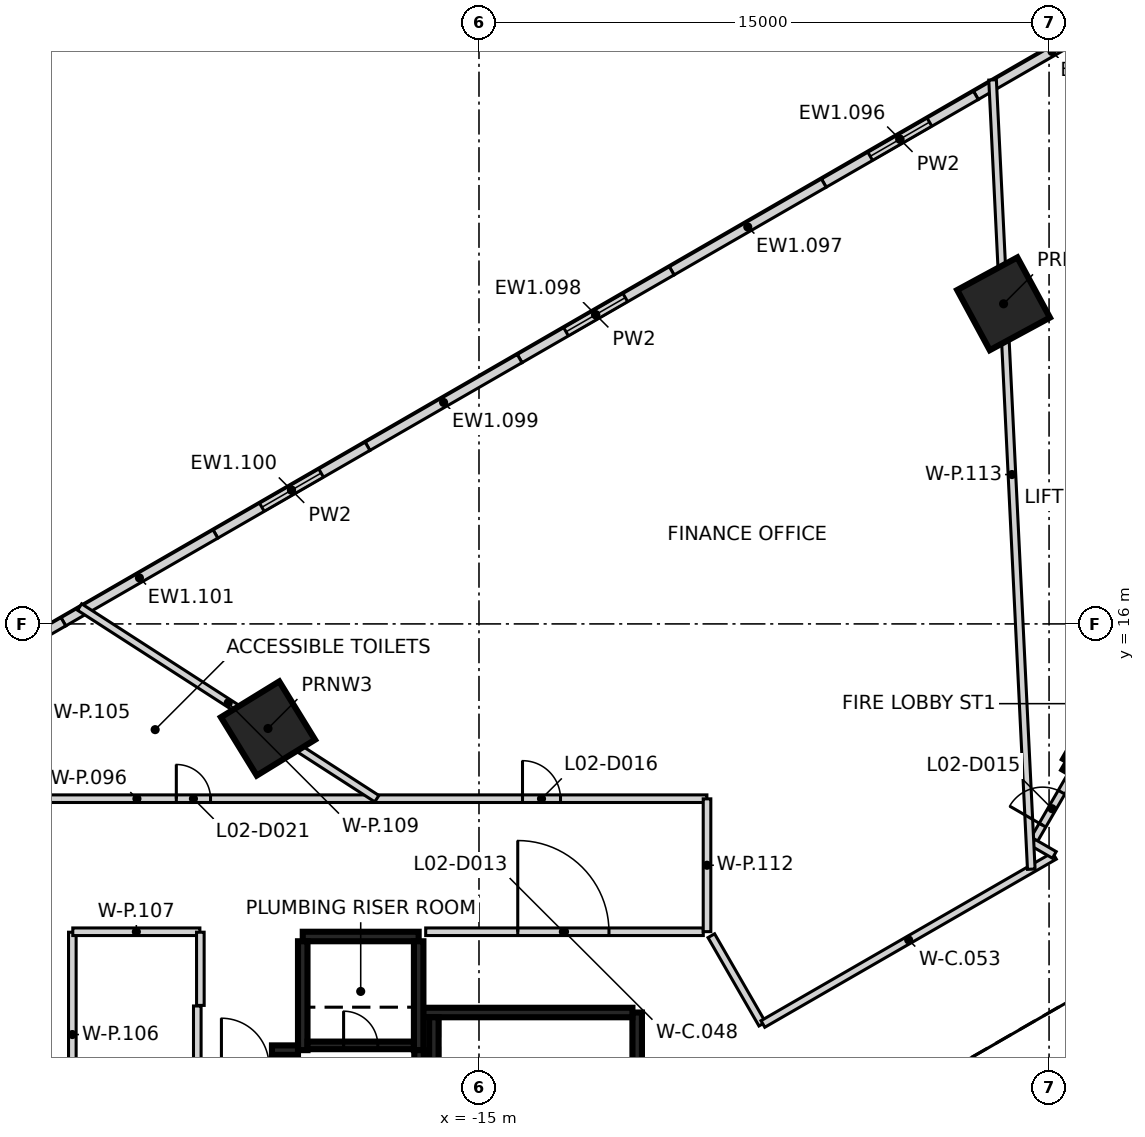
"""IFC4 building model, lengths in metres.
Left out: names, types, materials, properties, quantities, classifications, styles, units other than length and angle.
Written with IfcOpenShell. Run it as: python <this file> out.ifc"""

import sys

from ifc_helpers import new_model, si_unit, direction, frame, frame_2d, origin, origin_2d, place, context, subcontext, project, spatial, rectangle, extrude, element, fill, save


model = new_model("IFC4")
c1 = context("Model", 3, precision=1e-05, world=origin(), true_north=direction((0.0, 1.0)))
c2 = subcontext(c1, "Body", "Model", "MODEL_VIEW")
j1 = project(units=[si_unit("LENGTHUNIT", "METRE"), si_unit("PLANEANGLEUNIT", "RADIAN")], contexts=[c1])
p1 = place(None, origin())
s1 = spatial("IfcSite", under=j1, at=p1, CompositionType="ELEMENT")
p2 = place(p1, origin())
s2 = spatial("IfcBuilding", under=s1, at=p2, CompositionType="ELEMENT")
p3 = place(p2, frame((0.0, 0.0, 14.0)))
s3 = spatial("IfcBuildingStorey", under=s2, at=p3, CompositionType="ELEMENT", Elevation=14.0)
for number, where, z_axis, x_axis in (
    (1, (-1.197, 24.423, -0.35), (0.0, 0.0, 1.0), (-0.476, 0.879, 0.0)),
    (2, (-20.552, 13.248, -0.35), (0.0, 0.0, 1.0), (-0.523, 0.852, 0.0)),
):
    element("IfcColumn", number, at=place(p3, frame(where, z_axis=z_axis, x_axis=x_axis)), inside=s3, PredefinedType="COLUMN", context=c2, shape_type="SweptSolid", body=[
        extrude(rectangle(XDim=1.8, YDim=1.8, at=origin_2d()), origin(), (0.0, 0.0, 1.0), 3.1),
    ])
p4 = place(p3, frame((-1.925, 29.907, 0.0), z_axis=(0.0, 0.0, 1.0), x_axis=(0.866229571029, 0.499646205105, 0.0)))
e3 = element("IfcWall", 3, at=p4, inside=s3, PredefinedType="SOLIDWALL", context=c2, shape_type="SweptSolid", body=[
    extrude(rectangle(XDim=4.62, YDim=0.25, at=frame_2d((2.31, 0.0))), origin(), (0.0, 0.0, 1.0), 5.15),
])
p5 = place(p3, frame((-5.927, 27.598, 0.0), z_axis=(0.0, 0.0, 1.0), x_axis=(0.866193503994, 0.4997087288, 0.0)))
e4 = element("IfcWall", 4, at=p5, inside=s3, PredefinedType="SOLIDWALL", context=c2, shape_type="SweptSolid", body=[
    extrude(rectangle(XDim=4.62, YDim=0.25, at=frame_2d((2.31, 0.0))), origin(), (0.0, 0.0, 1.0), 5.15),
])
p6 = place(p5, frame((1.41, 0.0, 1.1)))
e5 = element("IfcOpeningElement", 5, at=p6, cuts=e4, PredefinedType="OPENING", context=c2, shape_type="SweptSolid", body=[
    extrude(rectangle(XDim=1.8, YDim=1.5, at=frame_2d((0.9, 0.75))), frame((0.0, 0.135, 0.0), z_axis=(0.0, -1.0, 0.0), x_axis=(1.0, 0.0, 0.0)), (0.0, 0.0, 1.0), 0.27),
])
p7 = place(p3, frame((-9.929, 25.29, 0.0), z_axis=(0.0, 0.0, 1.0), x_axis=(0.866216377649, 0.499669077583, 0.0)))
e6 = element("IfcWall", 6, at=p7, inside=s3, PredefinedType="SOLIDWALL", context=c2, shape_type="SweptSolid", body=[
    extrude(rectangle(XDim=4.62, YDim=0.25, at=frame_2d((2.31, 0.0))), origin(), (0.0, 0.0, 1.0), 5.15),
])
p8 = place(p3, frame((-13.93, 22.982, 0.0), z_axis=(0.0, 0.0, 1.0), x_axis=(0.866216377649, 0.499669077583, 0.0)))
e7 = element("IfcWall", 7, at=p8, inside=s3, PredefinedType="SOLIDWALL", context=c2, shape_type="SweptSolid", body=[
    extrude(rectangle(XDim=4.62, YDim=0.25, at=frame_2d((2.31, 0.0))), origin(), (0.0, 0.0, 1.0), 5.15),
])
p9 = place(p8, frame((1.41, 0.0, 1.1)))
e8 = element("IfcOpeningElement", 8, at=p9, cuts=e7, PredefinedType="OPENING", context=c2, shape_type="SweptSolid", body=[
    extrude(rectangle(XDim=1.8, YDim=1.5, at=frame_2d((0.9, 0.75))), frame((0.0, 0.135, 0.0), z_axis=(0.0, -1.0, 0.0), x_axis=(1.0, 0.0, 0.0)), (0.0, 0.0, 1.0), 0.27),
])
p10 = place(p3, frame((-17.932, 20.673, 0.0), z_axis=(0.0, 0.0, 1.0), x_axis=(0.866216377649, 0.499669077583, 0.0)))
e9 = element("IfcWall", 9, at=p10, inside=s3, PredefinedType="SOLIDWALL", context=c2, shape_type="SweptSolid", body=[
    extrude(rectangle(XDim=4.62, YDim=0.25, at=frame_2d((2.31, 0.0))), origin(), (0.0, 0.0, 1.0), 5.15),
])
p11 = place(p3, frame((-21.934, 18.365, 0.0), z_axis=(0.0, 0.0, 1.0), x_axis=(0.866229571029, 0.499646205105, 0.0)))
e10 = element("IfcWall", 10, at=p11, inside=s3, PredefinedType="SOLIDWALL", context=c2, shape_type="SweptSolid", body=[
    extrude(rectangle(XDim=4.62, YDim=0.25, at=frame_2d((2.31, 0.0))), origin(), (0.0, 0.0, 1.0), 5.15),
])
p12 = place(p11, frame((1.41, 0.0, 1.1)))
e11 = element("IfcOpeningElement", 11, at=p12, cuts=e10, PredefinedType="OPENING", context=c2, shape_type="SweptSolid", body=[
    extrude(rectangle(XDim=1.8, YDim=1.5, at=frame_2d((0.9, 0.75))), frame((0.0, 0.135, 0.0), z_axis=(0.0, -1.0, 0.0), x_axis=(1.0, 0.0, 0.0)), (0.0, 0.0, 1.0), 0.27),
])
p13 = place(p3, frame((-25.936, 16.057, 0.0), z_axis=(0.0, 0.0, 1.0), x_axis=(0.866216377649, 0.499669077583, 0.0)))
e12 = element("IfcWall", 12, at=p13, inside=s3, PredefinedType="SOLIDWALL", context=c2, shape_type="SweptSolid", body=[
    extrude(rectangle(XDim=4.62, YDim=0.25, at=frame_2d((2.31, 0.0))), origin(), (0.0, 0.0, 1.0), 5.15),
])
p14 = place(p3, frame((-29.938, 13.748, 0.0), z_axis=(0.0, 0.0, 1.0), x_axis=(0.866193503994, 0.4997087288, 0.0)))
e13 = element("IfcWall", 13, at=p14, inside=s3, PredefinedType="SOLIDWALL", context=c2, shape_type="SweptSolid", body=[
    extrude(rectangle(XDim=4.62, YDim=0.25, at=frame_2d((2.31, 0.0))), origin(), (0.0, 0.0, 1.0), 5.15),
])
p15 = place(p14, frame((1.41, 0.0, 1.1)))
e14 = element("IfcOpeningElement", 14, at=p15, cuts=e13, PredefinedType="OPENING", context=c2, shape_type="SweptSolid", body=[
    extrude(rectangle(XDim=1.8, YDim=1.5, at=frame_2d((0.9, 0.75))), frame((0.0, 0.135, 0.0), z_axis=(0.0, -1.0, 0.0), x_axis=(1.0, 0.0, 0.0)), (0.0, 0.0, 1.0), 0.27),
])
p16 = place(p3, frame((-10.837, 5.775, 0.0), z_axis=(0.0, 0.0, 1.0), x_axis=(0.0, -1.0, 0.0)))
e15 = element("IfcWall", 15, at=p16, inside=s3, PredefinedType="SHEAR", context=c2, shape_type="SweptSolid", body=[
    extrude(rectangle(XDim=11.55, YDim=0.25, at=frame_2d((5.775, 0.0))), origin(), (0.0, 0.0, 1.0), 5.15),
])
p17 = place(p16, frame((10.025, 0.0, 0.0)))
e16 = element("IfcOpeningElement", 16, at=p17, cuts=e15, PredefinedType="OPENING", context=c2, shape_type="SweptSolid", body=[
    extrude(rectangle(XDim=1.2, YDim=2.1, at=frame_2d((0.6, 1.05))), frame((0.0, 0.135, 0.0), z_axis=(0.0, -1.0, 0.0), x_axis=(1.0, 0.0, 0.0)), (0.0, 0.0, 1.0), 0.27),
])
p18 = place(p16, frame((8.725, 0.0, 0.0)))
e17 = element("IfcOpeningElement", 17, at=p18, cuts=e15, PredefinedType="OPENING", context=c2, shape_type="SweptSolid", body=[
    extrude(rectangle(XDim=1.2, YDim=2.1, at=frame_2d((0.6, 1.05))), frame((0.0, 0.135, 0.0), z_axis=(0.0, -1.0, 0.0), x_axis=(1.0, 0.0, 0.0)), (0.0, 0.0, 1.0), 0.27),
])
p19 = place(p3, frame((-16.472, 5.775, 0.0), z_axis=(0.0, 0.0, 1.0), x_axis=(1.0, 0.0, 0.0)))
e18 = element("IfcWall", 18, at=p19, inside=s3, PredefinedType="SHEAR", context=c2, shape_type="SweptSolid", body=[
    extrude(rectangle(XDim=5.51, YDim=0.25, at=frame_2d((2.755, 0.0))), origin(), (0.0, 0.0, 1.0), 5.15),
])
p20 = place(p3, frame((-19.637, 7.775, 0.0), z_axis=(0.0, 0.0, 1.0), x_axis=(1.0, 0.0, 0.0)))
e19 = element("IfcWall", 19, at=p20, inside=s3, PredefinedType="SHEAR", context=c2, shape_type="SweptSolid", body=[
    extrude(rectangle(XDim=3.05, YDim=0.25, at=frame_2d((1.525, 0.0))), origin(), (0.0, 0.0, 1.0), 5.15),
])
for number, where, z_axis, x_axis in (
    (20, (-16.587, 7.65, 0.0), (0.0, 0.0, 1.0), (0.0, -1.0, 0.0)),
    (21, (-19.637, 4.785, 0.0), (0.0, 0.0, 1.0), (0.0, 1.0, 0.0)),
):
    element("IfcWall", number, at=place(p3, frame(where, z_axis=z_axis, x_axis=x_axis)), inside=s3, PredefinedType="SHEAR", context=c2, shape_type="SweptSolid", body=[
        extrude(rectangle(XDim=2.865, YDim=0.25, at=frame_2d((1.432, 0.0))), origin(), (0.0, 0.0, 1.0), 5.15),
    ])
p21 = place(p3, frame((-16.187, 3.2, 0.0), z_axis=(0.0, 0.0, 1.0), x_axis=(0.0, 1.0, 0.0)))
e22 = element("IfcWall", 22, at=p21, inside=s3, PredefinedType="SHEAR", context=c2, shape_type="SweptSolid", body=[
    extrude(rectangle(XDim=2.449, YDim=0.25, at=frame_2d((1.225, 0.0))), origin(), (0.0, 0.0, 1.0), 5.15),
])
p22 = place(p3, frame((-20.447, 4.785, 0.0), z_axis=(0.0, 0.0, 1.0), x_axis=(1.0, 0.0, 0.0)))
e23 = element("IfcWall", 23, at=p22, inside=s3, PredefinedType="SHEAR", context=c2, shape_type="SweptSolid", body=[
    extrude(rectangle(XDim=0.685, YDim=0.25, at=frame_2d((0.342, 0.0))), origin(), (0.0, 0.0, 1.0), 5.15),
])
p23 = place(p3, frame((-16.577, 4.785, 0.0), z_axis=(0.0, 0.0, 1.0), x_axis=(0.0, -1.0, 0.0)))
e24 = element("IfcWall", 24, at=p23, inside=s3, PredefinedType="SHEAR", context=c2, shape_type="SweptSolid", body=[
    extrude(rectangle(XDim=0.344, YDim=0.25, at=frame_2d((0.172, 0.0))), origin(), (0.0, 0.0, 1.0), 5.15),
])
p24 = place(p3, frame((-19.511, 4.91, 0.0), z_axis=(0.0, 0.0, 1.0), x_axis=(1.0, 0.0, 0.0)))
e25 = element("IfcWall", 25, at=p24, inside=s3, PredefinedType="SHEAR", context=c2, shape_type="SweptSolid", body=[
    extrude(rectangle(XDim=2.798, YDim=0.2, at=frame_2d((1.399, 0.0))), origin(), (0.0, 0.0, 1.0), 5.15),
])
p25 = place(p24, frame((0.949, 0.0, 0.0)))
e26 = element("IfcOpeningElement", 26, at=p25, cuts=e25, PredefinedType="OPENING", context=c2, shape_type="SweptSolid", body=[
    extrude(rectangle(XDim=0.9, YDim=2.1, at=frame_2d((0.45, 1.05))), frame((0.0, 0.11, 0.0), z_axis=(0.0, -1.0, 0.0), x_axis=(1.0, 0.0, 0.0)), (0.0, 0.0, 1.0), 0.22),
])
p26 = place(p3, frame((10.42, 6.498, 0.0), z_axis=(0.0, 0.0, 1.0), x_axis=(-0.866021906294, 0.500006057782, 0.0)))
e27 = element("IfcWall", 27, at=p26, inside=s3, PredefinedType="SHEAR", context=c2, shape_type="SweptSolid", body=[
    extrude(rectangle(XDim=11.55, YDim=0.25, at=frame_2d((5.775, 0.0))), origin(), (0.0, 0.0, 1.0), 5.15),
])
p27 = place(p26, frame((10.025, 0.0, 0.0)))
e28 = element("IfcOpeningElement", 28, at=p27, cuts=e27, PredefinedType="OPENING", context=c2, shape_type="SweptSolid", body=[
    extrude(rectangle(XDim=1.2, YDim=2.1, at=frame_2d((0.6, 1.05))), frame((0.0, 0.135, 0.0), z_axis=(0.0, -1.0, 0.0), x_axis=(1.0, 0.0, 0.0)), (0.0, 0.0, 1.0), 0.27),
])
p28 = place(p26, frame((8.725, 0.0, 0.0)))
e29 = element("IfcOpeningElement", 29, at=p28, cuts=e27, PredefinedType="OPENING", context=c2, shape_type="SweptSolid", body=[
    extrude(rectangle(XDim=1.2, YDim=2.1, at=frame_2d((0.6, 1.05))), frame((0.0, 0.135, 0.0), z_axis=(0.0, -1.0, 0.0), x_axis=(1.0, 0.0, 0.0)), (0.0, 0.0, 1.0), 0.27),
])
p29 = place(p3, frame((0.48, 12.381, 0.0), z_axis=(0.0, 0.0, 1.0), x_axis=(0.49999885962, 0.866026062182, 0.0)))
e30 = element("IfcWall", 30, at=p29, inside=s3, PredefinedType="SHEAR", context=c2, shape_type="SweptSolid", body=[
    extrude(rectangle(XDim=5.225, YDim=0.25, at=frame_2d((2.612, 0.0))), origin(), (0.0, 0.0, 1.0), 5.15),
])
p30 = place(p3, frame((-16.402, 7.9, 0.0), z_axis=(0.0, 0.0, 1.0), x_axis=(1.0, 0.0, 0.0)))
e31 = element("IfcWall", 31, at=p30, inside=s3, PredefinedType="PARTITIONING", context=c2, shape_type="SweptSolid", body=[
    extrude(rectangle(XDim=7.304, YDim=0.2, at=frame_2d((3.652, 0.0))), origin(), (0.0, 0.0, 1.0), 5.15),
])
p31 = place(p30, frame((2.422, 0.0, 0.0)))
e32 = element("IfcOpeningElement", 32, at=p31, cuts=e31, PredefinedType="OPENING", context=c2, shape_type="SweptSolid", body=[
    extrude(rectangle(XDim=2.4, YDim=2.1, at=frame_2d((1.2, 1.05))), frame((0.0, 0.11, 0.0), z_axis=(0.0, -1.0, 0.0), x_axis=(1.0, 0.0, 0.0)), (0.0, 0.0, 1.0), 0.22),
])
p32 = place(p3, frame((-8.887, 7.796, 0.0), z_axis=(0.0, 0.0, 1.0), x_axis=(0.499310200174, -0.866423293779, 0.0)))
e33 = element("IfcWall", 33, at=p32, inside=s3, PredefinedType="PARTITIONING", context=c2, shape_type="SweptSolid", body=[
    extrude(rectangle(XDim=2.683, YDim=0.2, at=frame_2d((1.342, 0.0))), origin(), (0.0, 0.0, 1.0), 5.15),
])
p33 = place(p3, frame((-7.53, 5.473, 0.0), z_axis=(0.0, 0.0, 1.0), x_axis=(0.866256262405, 0.499599927786, 0.0)))
e34 = element("IfcWall", 34, at=p33, inside=s3, PredefinedType="PARTITIONING", context=c2, shape_type="SweptSolid", body=[
    extrude(rectangle(XDim=8.855, YDim=0.2, at=frame_2d((4.428, 0.0))), origin(), (0.0, 0.0, 1.0), 5.15),
])
p34 = place(p3, frame((-0.43, 10.259, 0.0), z_axis=(0.0, 0.0, 1.0), x_axis=(0.500667330647, 0.865639777288, 0.0)))
e35 = element("IfcWall", 35, at=p34, inside=s3, PredefinedType="PARTITIONING", context=c2, shape_type="SweptSolid", body=[
    extrude(rectangle(XDim=1.983, YDim=0.2, at=frame_2d((0.991, 0.0))), origin(), (0.0, 0.0, 1.0), 5.15),
])
p35 = place(p34, frame((0.515, 0.0, 0.0)))
e36 = element("IfcOpeningElement", 36, at=p35, cuts=e35, PredefinedType="OPENING", context=c2, shape_type="SweptSolid", body=[
    extrude(rectangle(XDim=1.0, YDim=2.1, at=frame_2d((0.5, 1.05))), frame((0.0, 0.11, 0.0), z_axis=(0.0, -1.0, 0.0), x_axis=(1.0, 0.0, 0.0)), (0.0, 0.0, 1.0), 0.22),
])
p36 = place(p3, frame((-0.424, 10.246, 0.0), z_axis=(0.0, 0.0, 1.0), x_axis=(0.866360968405, -0.499418334089, 0.0)))
e37 = element("IfcWall", 37, at=p36, inside=s3, PredefinedType="PARTITIONING", context=c2, shape_type="SweptSolid", body=[
    extrude(rectangle(XDim=0.649, YDim=0.2, at=frame_2d((0.324, 0.0))), origin(), (0.0, 0.0, 1.0), 5.15),
])
p37 = place(p3, frame((-38.998, 11.401, 0.0), z_axis=(0.0, 0.0, 1.0), x_axis=(1.0, 0.0, 0.0)))
e38 = element("IfcWall", 38, at=p37, inside=s3, PredefinedType="PARTITIONING", context=c2, shape_type="SweptSolid", body=[
    extrude(rectangle(XDim=29.995, YDim=0.2, at=frame_2d((14.998, 0.0))), origin(), (0.0, 0.0, 1.0), 2.75),
])
p38 = place(p37, frame((25.143, 0.0, 0.0)))
e39 = element("IfcOpeningElement", 39, at=p38, cuts=e38, PredefinedType="OPENING", context=c2, shape_type="SweptSolid", body=[
    extrude(rectangle(XDim=1.0, YDim=2.1, at=frame_2d((0.5, 1.05))), frame((0.0, 0.11, 0.0), z_axis=(0.0, -1.0, 0.0), x_axis=(1.0, 0.0, 0.0)), (0.0, 0.0, 1.0), 0.22),
])
p39 = place(p37, frame((7.76, 0.0, 0.0)))
e40 = element("IfcOpeningElement", 40, at=p39, cuts=e38, PredefinedType="OPENING", context=c2, shape_type="SweptSolid", body=[
    extrude(rectangle(XDim=0.8, YDim=2.1, at=frame_2d((0.4, 1.05))), frame((0.0, 0.11, 0.0), z_axis=(0.0, -1.0, 0.0), x_axis=(1.0, 0.0, 0.0)), (0.0, 0.0, 1.0), 0.22),
])
p40 = place(p37, frame((16.034, 0.0, 0.0)))
e41 = element("IfcOpeningElement", 41, at=p40, cuts=e38, PredefinedType="OPENING", context=c2, shape_type="SweptSolid", body=[
    extrude(rectangle(XDim=0.9, YDim=2.1, at=frame_2d((0.45, 1.05))), frame((0.0, 0.11, 0.0), z_axis=(0.0, -1.0, 0.0), x_axis=(1.0, 0.0, 0.0)), (0.0, 0.0, 1.0), 0.22),
])
p41 = place(p3, frame((-25.7, 2.503, 0.0), z_axis=(0.0, 0.0, 1.0), x_axis=(0.0, 1.0, 0.0)))
e42 = element("IfcWall", 42, at=p41, inside=s3, PredefinedType="PARTITIONING", context=c2, shape_type="SweptSolid", body=[
    extrude(rectangle(XDim=5.385, YDim=0.2, at=frame_2d((2.692, 0.0))), origin(), (0.0, 0.0, 1.0), 5.15),
])
p42 = place(p3, frame((-25.688, 7.9, 0.0), z_axis=(0.0, 0.0, 1.0), x_axis=(1.0, 0.0, 0.0)))
e43 = element("IfcWall", 43, at=p42, inside=s3, PredefinedType="PARTITIONING", context=c2, shape_type="SweptSolid", body=[
    extrude(rectangle(XDim=3.344, YDim=0.2, at=frame_2d((1.672, 0.0))), origin(), (0.0, 0.0, 1.0), 5.15),
])
p43 = place(p3, frame((-25.509, 16.444, 0.0), z_axis=(0.0, 0.0, 1.0), x_axis=(0.840484744403, -0.541835209659, 0.0)))
e44 = element("IfcWall", 44, at=p43, inside=s3, PredefinedType="PARTITIONING", context=c2, shape_type="SweptSolid", body=[
    extrude(rectangle(XDim=9.305, YDim=0.2, at=frame_2d((4.653, 0.0))), origin(), (0.0, 0.0, 1.0), 2.75),
])
p44 = place(p3, frame((-22.412, 4.56, 0.0), z_axis=(0.0, 0.0, 1.0), x_axis=(0.0, 1.0, 0.0)))
e45 = element("IfcWall", 45, at=p44, inside=s3, PredefinedType="PARTITIONING", context=c2, shape_type="SweptSolid", body=[
    extrude(rectangle(XDim=1.387, YDim=0.2, at=frame_2d((0.693, 0.0))), origin(), (0.0, 0.0, 1.0), 5.15),
])
p45 = place(p3, frame((-22.332, 7.888, 0.0), z_axis=(0.0, 0.0, 1.0), x_axis=(0.000507035047, -0.999999871458, 0.0)))
e46 = element("IfcWall", 46, at=p45, inside=s3, PredefinedType="PARTITIONING", context=c2, shape_type="SweptSolid", body=[
    extrude(rectangle(XDim=1.926, YDim=0.2, at=frame_2d((0.963, 0.0))), origin(), (0.0, 0.0, 1.0), 5.15),
])
p46 = place(p3, frame((-9.0, 7.903, 0.0), z_axis=(0.0, 0.0, 1.0), x_axis=(0.0, 1.0, 0.0)))
e47 = element("IfcWall", 47, at=p46, inside=s3, PredefinedType="PARTITIONING", context=c2, shape_type="SweptSolid", body=[
    extrude(rectangle(XDim=3.494, YDim=0.2, at=frame_2d((1.747, 0.0))), origin(), (0.0, 0.0, 1.0), 5.15),
])
p47 = place(p3, frame((-1.486, 30.314, 0.0), z_axis=(0.0, 0.0, 1.0), x_axis=(0.048977126554, -0.998799900418, 0.0)))
e48 = element("IfcWall", 48, at=p47, inside=s3, PredefinedType="PARTITIONING", context=c2, shape_type="SweptSolid", body=[
    extrude(rectangle(XDim=20.792, YDim=0.2, at=frame_2d((10.396, 0.0))), origin(), (0.0, 0.0, 1.0), 2.75),
])
p48 = place(p6, origin())
e49 = element("IfcWindow", 49, at=p48, inside=s3, PartitioningType="SINGLE_PANEL", PredefinedType="WINDOW", context=c2, shape_type="SweptSolid", body=[
    extrude(rectangle(XDim=1.8, YDim=1.5, at=frame_2d((0.9, 0.75))), frame((0.0, 0.03, 0.0), z_axis=(0.0, -1.0, 0.0), x_axis=(1.0, 0.0, 0.0)), (0.0, 0.0, 1.0), 0.06),
])
fill(e5, e49)
p49 = place(p9, origin())
e50 = element("IfcWindow", 50, at=p49, inside=s3, PartitioningType="SINGLE_PANEL", PredefinedType="WINDOW", context=c2, shape_type="SweptSolid", body=[
    extrude(rectangle(XDim=1.8, YDim=1.5, at=frame_2d((0.9, 0.75))), frame((0.0, 0.03, 0.0), z_axis=(0.0, -1.0, 0.0), x_axis=(1.0, 0.0, 0.0)), (0.0, 0.0, 1.0), 0.06),
])
fill(e8, e50)
p50 = place(p12, origin())
e51 = element("IfcWindow", 51, at=p50, inside=s3, PartitioningType="SINGLE_PANEL", PredefinedType="WINDOW", context=c2, shape_type="SweptSolid", body=[
    extrude(rectangle(XDim=1.8, YDim=1.5, at=frame_2d((0.9, 0.75))), frame((0.0, 0.03, 0.0), z_axis=(0.0, -1.0, 0.0), x_axis=(1.0, 0.0, 0.0)), (0.0, 0.0, 1.0), 0.06),
])
fill(e11, e51)
p51 = place(p25, origin())
e52 = element("IfcDoor", 52, at=p51, inside=s3, OperationType="SINGLE_SWING_RIGHT", PredefinedType="DOOR", context=c2, shape_type="SweptSolid", body=[
    extrude(rectangle(XDim=0.9, YDim=2.1, at=frame_2d((0.45, 1.05))), frame((0.0, 0.025, 0.0), z_axis=(0.0, -1.0, 0.0), x_axis=(1.0, 0.0, 0.0)), (0.0, 0.0, 1.0), 0.05),
])
fill(e26, e52)
p52 = place(p31, frame((2.4, 0.0, 0.0), z_axis=(0.0, 0.0, 1.0), x_axis=(-1.0, 0.0, 0.0)))
e53 = element("IfcDoor", 53, at=p52, inside=s3, OperationType="DOUBLE_DOOR_SINGLE_SWING", PredefinedType="DOOR", context=c2, shape_type="SweptSolid", body=[
    extrude(rectangle(XDim=2.4, YDim=2.1, at=frame_2d((1.2, 1.05))), frame((0.0, 0.025, 0.0), z_axis=(0.0, -1.0, 0.0), x_axis=(1.0, 0.0, 0.0)), (0.0, 0.0, 1.0), 0.05),
])
fill(e32, e53)
p53 = place(p35, frame((1.0, 0.0, 0.0), z_axis=(0.0, 0.0, 1.0), x_axis=(-1.0, 0.0, 0.0)))
e54 = element("IfcDoor", 54, at=p53, inside=s3, OperationType="SINGLE_SWING_LEFT", PredefinedType="DOOR", context=c2, shape_type="SweptSolid", body=[
    extrude(rectangle(XDim=1.0, YDim=2.1, at=frame_2d((0.5, 1.05))), frame((0.0, 0.025, 0.0), z_axis=(0.0, -1.0, 0.0), x_axis=(1.0, 0.0, 0.0)), (0.0, 0.0, 1.0), 0.05),
])
fill(e36, e54)
p54 = place(p38, origin())
e55 = element("IfcDoor", 55, at=p54, inside=s3, OperationType="SINGLE_SWING_LEFT", PredefinedType="DOOR", context=c2, shape_type="SweptSolid", body=[
    extrude(rectangle(XDim=1.0, YDim=2.1, at=frame_2d((0.5, 1.05))), frame((0.0, 0.025, 0.0), z_axis=(0.0, -1.0, 0.0), x_axis=(1.0, 0.0, 0.0)), (0.0, 0.0, 1.0), 0.05),
])
fill(e39, e55)
p55 = place(p40, origin())
e56 = element("IfcDoor", 56, at=p55, inside=s3, OperationType="SINGLE_SWING_LEFT", PredefinedType="DOOR", context=c2, shape_type="SweptSolid", body=[
    extrude(rectangle(XDim=0.9, YDim=2.1, at=frame_2d((0.45, 1.05))), frame((0.0, 0.025, 0.0), z_axis=(0.0, -1.0, 0.0), x_axis=(1.0, 0.0, 0.0)), (0.0, 0.0, 1.0), 0.05),
])
fill(e41, e56)
save(model, sys.argv[1])
